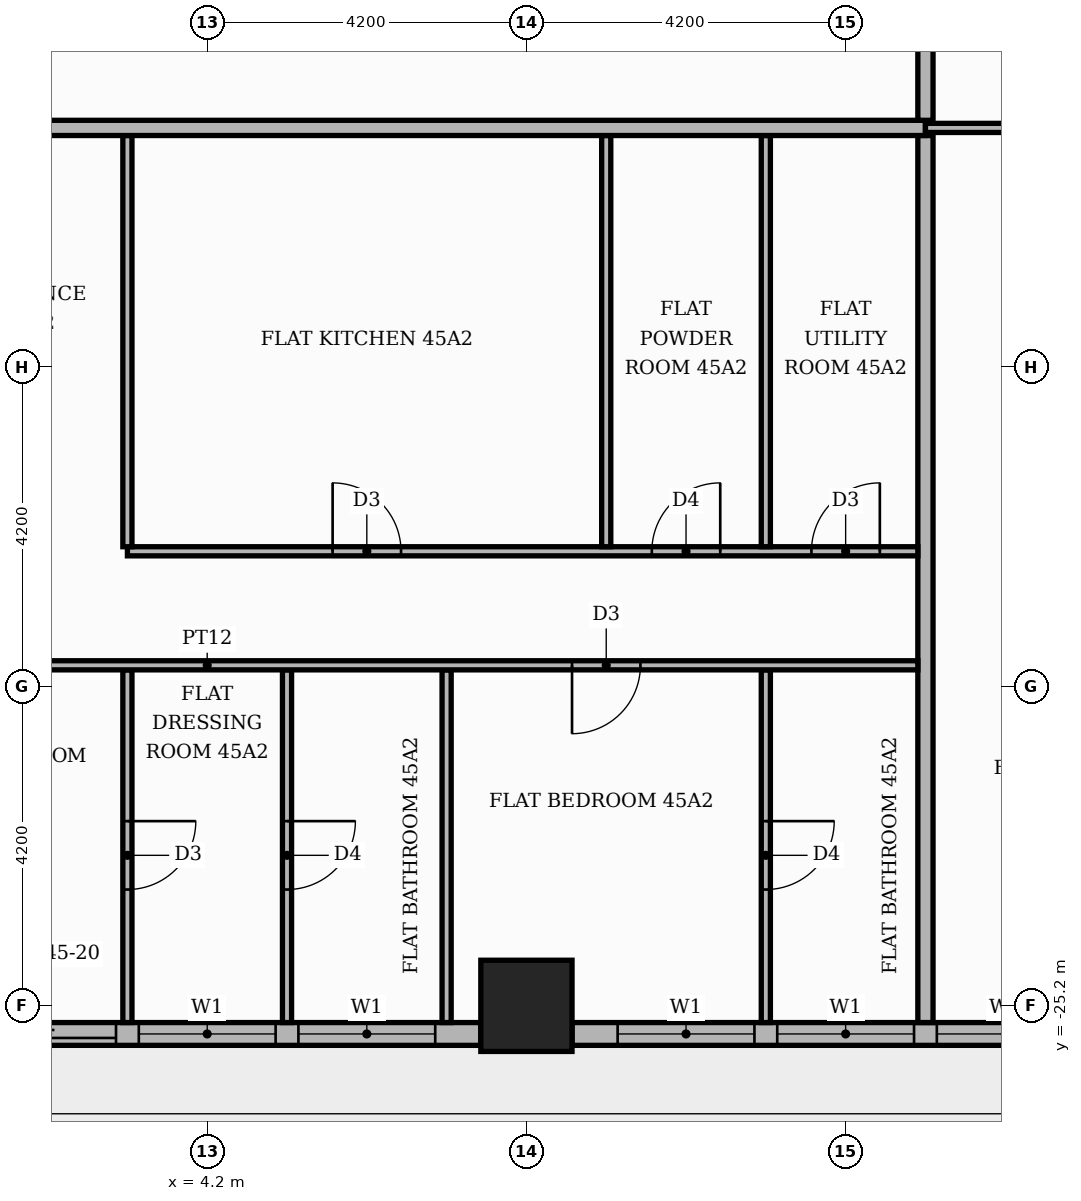
"""IFC4 building model, lengths in metres.
Left out: names, types, materials, properties, quantities, classifications, styles, units other than length and angle.
Written with IfcOpenShell. Run it as: python <this file> out.ifc"""

import sys

from ifc_helpers import new_model, si_unit, direction, frame, frame_2d, origin, origin_2d, place, context, subcontext, project, spatial, rectangle, extrude, element, fill, save


model = new_model("IFC4")
c1 = context("Model", 3, precision=1e-05, world=origin(), true_north=direction((0.0, 1.0)))
c2 = subcontext(c1, "Body", "Model", "MODEL_VIEW")
j1 = project(units=[si_unit("LENGTHUNIT", "METRE"), si_unit("PLANEANGLEUNIT", "RADIAN")], contexts=[c1])
p1 = place(None, origin())
s1 = spatial("IfcSite", under=j1, at=p1, CompositionType="ELEMENT")
p2 = place(p1, origin())
s2 = spatial("IfcBuilding", under=s1, at=p2, CompositionType="ELEMENT")
p3 = place(p2, frame((0.0, 0.0, 192.3)))
s3 = spatial("IfcBuildingStorey", under=s2, at=p3, CompositionType="ELEMENT", Elevation=192.3)
p4 = place(p3, frame((8.4, -25.2, 0.0), z_axis=(0.0, 0.0, 1.0), x_axis=(1.0, 0.0, 0.0)))
e1 = element("IfcColumn", 1, at=p4, inside=s3, PredefinedType="COLUMN", context=c2, shape_type="SweptSolid", body=[
    extrude(rectangle(XDim=1.2, YDim=1.2, at=origin_2d()), origin(), (0.0, 0.0, 1.0), 3.9),
])
p5 = place(p3, frame((0.6, -25.57, 0.0), z_axis=(0.0, 0.0, 1.0), x_axis=(1.0, 0.0, 0.0)))
e2 = element("IfcWall", 2, at=p5, inside=s3, PredefinedType="STANDARD", context=c2, shape_type="SweptSolid", body=[
    extrude(rectangle(XDim=7.2, YDim=0.3, at=frame_2d((3.6, 0.0))), origin(), (0.0, 0.0, 1.0), 3.48),
])
p6 = place(p5, frame((0.6, 0.0, 0.0)))
e3 = element("IfcOpeningElement", 3, at=p6, cuts=e2, PredefinedType="OPENING", context=c2, shape_type="SweptSolid", body=[
    extrude(rectangle(XDim=1.8, YDim=2.4, at=frame_2d((0.9, 1.2))), frame((0.0, 0.16, 0.0), z_axis=(0.0, -1.0, 0.0), x_axis=(1.0, 0.0, 0.0)), (0.0, 0.0, 1.0), 0.32),
])
p7 = place(p5, frame((2.7, 0.0, 0.9)))
e4 = element("IfcOpeningElement", 4, at=p7, cuts=e2, PredefinedType="OPENING", context=c2, shape_type="SweptSolid", body=[
    extrude(rectangle(XDim=1.8, YDim=2.1, at=frame_2d((0.9, 1.05))), frame((0.0, 0.16, 0.0), z_axis=(0.0, -1.0, 0.0), x_axis=(1.0, 0.0, 0.0)), (0.0, 0.0, 1.0), 0.32),
])
p8 = place(p5, frame((4.8, 0.0, 0.9)))
e5 = element("IfcOpeningElement", 5, at=p8, cuts=e2, PredefinedType="OPENING", context=c2, shape_type="SweptSolid", body=[
    extrude(rectangle(XDim=1.8, YDim=2.1, at=frame_2d((0.9, 1.05))), frame((0.0, 0.16, 0.0), z_axis=(0.0, -1.0, 0.0), x_axis=(1.0, 0.0, 0.0)), (0.0, 0.0, 1.0), 0.32),
])
p9 = place(p3, frame((9.0, -25.57, 0.0), z_axis=(0.0, 0.0, 1.0), x_axis=(1.0, 0.0, 0.0)))
e6 = element("IfcWall", 6, at=p9, inside=s3, PredefinedType="STANDARD", context=c2, shape_type="SweptSolid", body=[
    extrude(rectangle(XDim=7.2, YDim=0.3, at=frame_2d((3.6, 0.0))), origin(), (0.0, 0.0, 1.0), 3.48),
])
p10 = place(p9, frame((0.6, 0.0, 0.9)))
e7 = element("IfcOpeningElement", 7, at=p10, cuts=e6, PredefinedType="OPENING", context=c2, shape_type="SweptSolid", body=[
    extrude(rectangle(XDim=1.8, YDim=2.1, at=frame_2d((0.9, 1.05))), frame((0.0, 0.16, 0.0), z_axis=(0.0, -1.0, 0.0), x_axis=(1.0, 0.0, 0.0)), (0.0, 0.0, 1.0), 0.32),
])
p11 = place(p9, frame((2.7, 0.0, 0.9)))
e8 = element("IfcOpeningElement", 8, at=p11, cuts=e6, PredefinedType="OPENING", context=c2, shape_type="SweptSolid", body=[
    extrude(rectangle(XDim=1.8, YDim=2.1, at=frame_2d((0.9, 1.05))), frame((0.0, 0.16, 0.0), z_axis=(0.0, -1.0, 0.0), x_axis=(1.0, 0.0, 0.0)), (0.0, 0.0, 1.0), 0.32),
])
p12 = place(p9, frame((4.8, 0.0, 0.9)))
e9 = element("IfcOpeningElement", 9, at=p12, cuts=e6, PredefinedType="OPENING", context=c2, shape_type="SweptSolid", body=[
    extrude(rectangle(XDim=1.8, YDim=2.1, at=frame_2d((0.9, 1.05))), frame((0.0, 0.16, 0.0), z_axis=(0.0, -1.0, 0.0), x_axis=(1.0, 0.0, 0.0)), (0.0, 0.0, 1.0), 0.32),
])
p13 = place(p3, frame((3.15, -25.42, 0.0), z_axis=(0.0, 0.0, 1.0), x_axis=(0.0, 1.0, 0.0)))
e10 = element("IfcWall", 10, at=p13, inside=s3, PredefinedType="PARTITIONING", context=c2, shape_type="SweptSolid", body=[
    extrude(rectangle(XDim=4.64, YDim=0.12, at=frame_2d((2.32, 0.0))), origin(), (0.0, 0.0, 1.0), 3.48),
])
p14 = place(p13, frame((1.75, 0.0, 0.0)))
e11 = element("IfcOpeningElement", 11, at=p14, cuts=e10, PredefinedType="OPENING", context=c2, shape_type="SweptSolid", body=[
    extrude(rectangle(XDim=0.9, YDim=2.1, at=frame_2d((0.45, 1.05))), frame((0.0, 0.07, 0.0), z_axis=(0.0, -1.0, 0.0), x_axis=(1.0, 0.0, 0.0)), (0.0, 0.0, 1.0), 0.14),
])
p15 = place(p3, frame((5.25, -25.42, 0.0), z_axis=(0.0, 0.0, 1.0), x_axis=(0.0, 1.0, 0.0)))
e12 = element("IfcWall", 12, at=p15, inside=s3, PredefinedType="PARTITIONING", context=c2, shape_type="SweptSolid", body=[
    extrude(rectangle(XDim=4.64, YDim=0.12, at=frame_2d((2.32, 0.0))), origin(), (0.0, 0.0, 1.0), 3.48),
])
p16 = place(p15, frame((1.75, 0.0, 0.0)))
e13 = element("IfcOpeningElement", 13, at=p16, cuts=e12, PredefinedType="OPENING", context=c2, shape_type="SweptSolid", body=[
    extrude(rectangle(XDim=0.9, YDim=2.1, at=frame_2d((0.45, 1.05))), frame((0.0, 0.07, 0.0), z_axis=(0.0, -1.0, 0.0), x_axis=(1.0, 0.0, 0.0)), (0.0, 0.0, 1.0), 0.14),
])
p17 = place(p3, frame((7.35, -25.42, 0.0), z_axis=(0.0, 0.0, 1.0), x_axis=(0.0, 1.0, 0.0)))
e14 = element("IfcWall", 14, at=p17, inside=s3, PredefinedType="PARTITIONING", context=c2, shape_type="SweptSolid", body=[
    extrude(rectangle(XDim=4.64, YDim=0.12, at=frame_2d((2.32, 0.0))), origin(), (0.0, 0.0, 1.0), 3.48),
])
p18 = place(p3, frame((11.55, -25.42, 0.0), z_axis=(0.0, 0.0, 1.0), x_axis=(0.0, 1.0, 0.0)))
e15 = element("IfcWall", 15, at=p18, inside=s3, PredefinedType="PARTITIONING", context=c2, shape_type="SweptSolid", body=[
    extrude(rectangle(XDim=4.64, YDim=0.12, at=frame_2d((2.32, 0.0))), origin(), (0.0, 0.0, 1.0), 3.48),
])
p19 = place(p18, frame((1.75, 0.0, 0.0)))
e16 = element("IfcOpeningElement", 16, at=p19, cuts=e15, PredefinedType="OPENING", context=c2, shape_type="SweptSolid", body=[
    extrude(rectangle(XDim=0.9, YDim=2.1, at=frame_2d((0.45, 1.05))), frame((0.0, 0.07, 0.0), z_axis=(0.0, -1.0, 0.0), x_axis=(1.0, 0.0, 0.0)), (0.0, 0.0, 1.0), 0.14),
])
p20 = place(p3, frame((13.65, -25.42, 0.0), z_axis=(0.0, 0.0, 1.0), x_axis=(0.0, 1.0, 0.0)))
e17 = element("IfcWall", 17, at=p20, inside=s3, PredefinedType="PARTITIONING", context=c2, shape_type="SweptSolid", body=[
    extrude(rectangle(XDim=11.67, YDim=0.2, at=frame_2d((5.835, 0.0))), origin(), (0.0, 0.0, 1.0), 3.48),
])
p21 = place(p3, frame((-5.15, -20.72, 0.0), z_axis=(0.0, 0.0, 1.0), x_axis=(1.0, 0.0, 0.0)))
e18 = element("IfcWall", 18, at=p21, inside=s3, PredefinedType="PARTITIONING", context=c2, shape_type="SweptSolid", body=[
    extrude(rectangle(XDim=18.7, YDim=0.12, at=frame_2d((9.35, 0.0))), origin(), (0.0, 0.0, 1.0), 3.48),
])
p22 = place(p21, frame((1.5, 0.0, 0.0)))
e19 = element("IfcOpeningElement", 19, at=p22, cuts=e18, PredefinedType="OPENING", context=c2, shape_type="SweptSolid", body=[
    extrude(rectangle(XDim=1.0, YDim=2.1, at=frame_2d((0.5, 1.05))), frame((0.0, 0.07, 0.0), z_axis=(0.0, -1.0, 0.0), x_axis=(1.0, 0.0, 0.0)), (0.0, 0.0, 1.0), 0.14),
])
p23 = place(p21, frame((5.75, 0.0, 0.0)))
e20 = element("IfcOpeningElement", 20, at=p23, cuts=e18, PredefinedType="OPENING", context=c2, shape_type="SweptSolid", body=[
    extrude(rectangle(XDim=0.9, YDim=2.1, at=frame_2d((0.45, 1.05))), frame((0.0, 0.07, 0.0), z_axis=(0.0, -1.0, 0.0), x_axis=(1.0, 0.0, 0.0)), (0.0, 0.0, 1.0), 0.14),
])
p24 = place(p21, frame((14.15, 0.0, 0.0)))
e21 = element("IfcOpeningElement", 21, at=p24, cuts=e18, PredefinedType="OPENING", context=c2, shape_type="SweptSolid", body=[
    extrude(rectangle(XDim=0.9, YDim=2.1, at=frame_2d((0.45, 1.05))), frame((0.0, 0.07, 0.0), z_axis=(0.0, -1.0, 0.0), x_axis=(1.0, 0.0, 0.0)), (0.0, 0.0, 1.0), 0.14),
])
p25 = place(p3, frame((3.15, -19.22, 0.0), z_axis=(0.0, 0.0, 1.0), x_axis=(1.0, 0.0, 0.0)))
e22 = element("IfcWall", 22, at=p25, inside=s3, PredefinedType="PARTITIONING", context=c2, shape_type="SweptSolid", body=[
    extrude(rectangle(XDim=10.4, YDim=0.12, at=frame_2d((5.2, 0.0))), origin(), (0.0, 0.0, 1.0), 3.48),
])
p26 = place(p25, frame((2.7, 0.0, 0.0)))
e23 = element("IfcOpeningElement", 23, at=p26, cuts=e22, PredefinedType="OPENING", context=c2, shape_type="SweptSolid", body=[
    extrude(rectangle(XDim=0.9, YDim=2.1, at=frame_2d((0.45, 1.05))), frame((0.0, 0.07, 0.0), z_axis=(0.0, -1.0, 0.0), x_axis=(1.0, 0.0, 0.0)), (0.0, 0.0, 1.0), 0.14),
])
p27 = place(p25, frame((6.9, 0.0, 0.0)))
e24 = element("IfcOpeningElement", 24, at=p27, cuts=e22, PredefinedType="OPENING", context=c2, shape_type="SweptSolid", body=[
    extrude(rectangle(XDim=0.9, YDim=2.1, at=frame_2d((0.45, 1.05))), frame((0.0, 0.07, 0.0), z_axis=(0.0, -1.0, 0.0), x_axis=(1.0, 0.0, 0.0)), (0.0, 0.0, 1.0), 0.14),
])
p28 = place(p25, frame((9.0, 0.0, 0.0)))
e25 = element("IfcOpeningElement", 25, at=p28, cuts=e22, PredefinedType="OPENING", context=c2, shape_type="SweptSolid", body=[
    extrude(rectangle(XDim=0.9, YDim=2.1, at=frame_2d((0.45, 1.05))), frame((0.0, 0.07, 0.0), z_axis=(0.0, -1.0, 0.0), x_axis=(1.0, 0.0, 0.0)), (0.0, 0.0, 1.0), 0.14),
])
for number, where, z_axis, x_axis in (
    (26, (3.15, -19.16, 0.0), (0.0, 0.0, 1.0), (0.0, 1.0, 0.0)),
    (27, (9.45, -19.16, 0.0), (0.0, 0.0, 1.0), (0.0, 1.0, 0.0)),
    (28, (11.55, -19.16, 0.0), (0.0, 0.0, 1.0), (0.0, 1.0, 0.0)),
):
    element("IfcWall", number, at=place(p3, frame(where, z_axis=z_axis, x_axis=x_axis)), inside=s3, PredefinedType="PARTITIONING", context=c2, shape_type="SweptSolid", body=[
        extrude(rectangle(XDim=5.41, YDim=0.12, at=frame_2d((2.705, 0.0))), origin(), (0.0, 0.0, 1.0), 3.48),
    ])
p29 = place(p3, frame((-25.42, -13.65, 0.0), z_axis=(0.0, 0.0, 1.0), x_axis=(1.0, 0.0, 0.0)))
e29 = element("IfcWall", 29, at=p29, inside=s3, PredefinedType="PARTITIONING", context=c2, shape_type="SweptSolid", body=[
    extrude(rectangle(XDim=39.07, YDim=0.2, at=frame_2d((19.535, 0.0))), origin(), (0.0, 0.0, 1.0), 3.48),
])
p30 = place(p29, frame((13.32, 0.0, 0.0)))
e30 = element("IfcOpeningElement", 30, at=p30, cuts=e29, PredefinedType="OPENING", context=c2, shape_type="SweptSolid", body=[
    extrude(rectangle(XDim=1.1, YDim=2.4, at=frame_2d((0.55, 1.2))), frame((0.0, 0.11, 0.0), z_axis=(0.0, -1.0, 0.0), x_axis=(1.0, 0.0, 0.0)), (0.0, 0.0, 1.0), 0.22),
])
p31 = place(p29, frame((25.92, 0.0, 0.0)))
e31 = element("IfcOpeningElement", 31, at=p31, cuts=e29, PredefinedType="OPENING", context=c2, shape_type="SweptSolid", body=[
    extrude(rectangle(XDim=1.1, YDim=2.4, at=frame_2d((0.55, 1.2))), frame((0.0, 0.11, 0.0), z_axis=(0.0, -1.0, 0.0), x_axis=(1.0, 0.0, 0.0)), (0.0, 0.0, 1.0), 0.22),
])
p32 = place(p3, frame((13.65, -13.65, 0.0), z_axis=(0.0, 0.0, 1.0), x_axis=(1.0, 0.0, 0.0)))
e32 = element("IfcWall", 32, at=p32, inside=s3, PredefinedType="PARTITIONING", context=c2, shape_type="SweptSolid", body=[
    extrude(rectangle(XDim=6.47, YDim=0.12, at=frame_2d((3.235, 0.0))), origin(), (0.0, 0.0, 1.0), 3.48),
])
p33 = place(p32, frame((2.785, 0.0, 0.0)))
e33 = element("IfcOpeningElement", 33, at=p33, cuts=e32, PredefinedType="OPENING", context=c2, shape_type="SweptSolid", body=[
    extrude(rectangle(XDim=0.9, YDim=2.1, at=frame_2d((0.45, 1.05))), frame((0.0, 0.07, 0.0), z_axis=(0.0, -1.0, 0.0), x_axis=(1.0, 0.0, 0.0)), (0.0, 0.0, 1.0), 0.14),
])
p34 = place(p3, frame((13.65, -13.55, 0.0), z_axis=(0.0, 0.0, 1.0), x_axis=(0.0, 1.0, 0.0)))
e34 = element("IfcWall", 34, at=p34, inside=s3, PredefinedType="PARTITIONING", context=c2, shape_type="SweptSolid", body=[
    extrude(rectangle(XDim=2.45, YDim=0.2, at=frame_2d((1.225, 0.0))), origin(), (0.0, 0.0, 1.0), 3.48),
])
p35 = place(p6, origin())
e35 = element("IfcDoor", 35, at=p35, inside=s3, OperationType="SLIDING_TO_LEFT", PredefinedType="DOOR", context=c2, shape_type="SweptSolid", body=[
    extrude(rectangle(XDim=1.8, YDim=2.4, at=frame_2d((0.9, 1.2))), frame((0.0, 0.025, 0.0), z_axis=(0.0, -1.0, 0.0), x_axis=(1.0, 0.0, 0.0)), (0.0, 0.0, 1.0), 0.05),
])
fill(e3, e35)
p36 = place(p7, origin())
e36 = element("IfcWindow", 36, at=p36, inside=s3, PartitioningType="SINGLE_PANEL", PredefinedType="WINDOW", context=c2, shape_type="SweptSolid", body=[
    extrude(rectangle(XDim=1.8, YDim=2.1, at=frame_2d((0.9, 1.05))), frame((0.0, 0.03, 0.0), z_axis=(0.0, -1.0, 0.0), x_axis=(1.0, 0.0, 0.0)), (0.0, 0.0, 1.0), 0.06),
])
fill(e4, e36)
p37 = place(p8, origin())
e37 = element("IfcWindow", 37, at=p37, inside=s3, PartitioningType="SINGLE_PANEL", PredefinedType="WINDOW", context=c2, shape_type="SweptSolid", body=[
    extrude(rectangle(XDim=1.8, YDim=2.1, at=frame_2d((0.9, 1.05))), frame((0.0, 0.03, 0.0), z_axis=(0.0, -1.0, 0.0), x_axis=(1.0, 0.0, 0.0)), (0.0, 0.0, 1.0), 0.06),
])
fill(e5, e37)
p38 = place(p10, origin())
e38 = element("IfcWindow", 38, at=p38, inside=s3, PartitioningType="SINGLE_PANEL", PredefinedType="WINDOW", context=c2, shape_type="SweptSolid", body=[
    extrude(rectangle(XDim=1.8, YDim=2.1, at=frame_2d((0.9, 1.05))), frame((0.0, 0.03, 0.0), z_axis=(0.0, -1.0, 0.0), x_axis=(1.0, 0.0, 0.0)), (0.0, 0.0, 1.0), 0.06),
])
fill(e7, e38)
p39 = place(p11, origin())
e39 = element("IfcWindow", 39, at=p39, inside=s3, PartitioningType="SINGLE_PANEL", PredefinedType="WINDOW", context=c2, shape_type="SweptSolid", body=[
    extrude(rectangle(XDim=1.8, YDim=2.1, at=frame_2d((0.9, 1.05))), frame((0.0, 0.03, 0.0), z_axis=(0.0, -1.0, 0.0), x_axis=(1.0, 0.0, 0.0)), (0.0, 0.0, 1.0), 0.06),
])
fill(e8, e39)
p40 = place(p12, origin())
e40 = element("IfcWindow", 40, at=p40, inside=s3, PartitioningType="SINGLE_PANEL", PredefinedType="WINDOW", context=c2, shape_type="SweptSolid", body=[
    extrude(rectangle(XDim=1.8, YDim=2.1, at=frame_2d((0.9, 1.05))), frame((0.0, 0.03, 0.0), z_axis=(0.0, -1.0, 0.0), x_axis=(1.0, 0.0, 0.0)), (0.0, 0.0, 1.0), 0.06),
])
fill(e9, e40)
p41 = place(p26, origin())
e41 = element("IfcDoor", 41, at=p41, inside=s3, OperationType="SINGLE_SWING_LEFT", PredefinedType="DOOR", context=c2, shape_type="SweptSolid", body=[
    extrude(rectangle(XDim=0.9, YDim=2.1, at=frame_2d((0.45, 1.05))), frame((0.0, 0.025, 0.0), z_axis=(0.0, -1.0, 0.0), x_axis=(1.0, 0.0, 0.0)), (0.0, 0.0, 1.0), 0.05),
])
fill(e23, e41)
p42 = place(p27, origin())
e42 = element("IfcDoor", 42, at=p42, inside=s3, OperationType="SINGLE_SWING_RIGHT", PredefinedType="DOOR", context=c2, shape_type="SweptSolid", body=[
    extrude(rectangle(XDim=0.9, YDim=2.1, at=frame_2d((0.45, 1.05))), frame((0.0, 0.025, 0.0), z_axis=(0.0, -1.0, 0.0), x_axis=(1.0, 0.0, 0.0)), (0.0, 0.0, 1.0), 0.05),
])
fill(e24, e42)
p43 = place(p28, origin())
e43 = element("IfcDoor", 43, at=p43, inside=s3, OperationType="SINGLE_SWING_RIGHT", PredefinedType="DOOR", context=c2, shape_type="SweptSolid", body=[
    extrude(rectangle(XDim=0.9, YDim=2.1, at=frame_2d((0.45, 1.05))), frame((0.0, 0.025, 0.0), z_axis=(0.0, -1.0, 0.0), x_axis=(1.0, 0.0, 0.0)), (0.0, 0.0, 1.0), 0.05),
])
fill(e25, e43)
p44 = place(p14, frame((0.9, 0.0, 0.0), z_axis=(0.0, 0.0, 1.0), x_axis=(-1.0, 0.0, 0.0)))
e44 = element("IfcDoor", 44, at=p44, inside=s3, OperationType="SINGLE_SWING_RIGHT", PredefinedType="DOOR", context=c2, shape_type="SweptSolid", body=[
    extrude(rectangle(XDim=0.9, YDim=2.1, at=frame_2d((0.45, 1.05))), frame((0.0, 0.025, 0.0), z_axis=(0.0, -1.0, 0.0), x_axis=(1.0, 0.0, 0.0)), (0.0, 0.0, 1.0), 0.05),
])
fill(e11, e44)
p45 = place(p16, frame((0.9, 0.0, 0.0), z_axis=(0.0, 0.0, 1.0), x_axis=(-1.0, 0.0, 0.0)))
e45 = element("IfcDoor", 45, at=p45, inside=s3, OperationType="SINGLE_SWING_RIGHT", PredefinedType="DOOR", context=c2, shape_type="SweptSolid", body=[
    extrude(rectangle(XDim=0.9, YDim=2.1, at=frame_2d((0.45, 1.05))), frame((0.0, 0.025, 0.0), z_axis=(0.0, -1.0, 0.0), x_axis=(1.0, 0.0, 0.0)), (0.0, 0.0, 1.0), 0.05),
])
fill(e13, e45)
p46 = place(p24, frame((0.9, 0.0, 0.0), z_axis=(0.0, 0.0, 1.0), x_axis=(-1.0, 0.0, 0.0)))
e46 = element("IfcDoor", 46, at=p46, inside=s3, OperationType="SINGLE_SWING_LEFT", PredefinedType="DOOR", context=c2, shape_type="SweptSolid", body=[
    extrude(rectangle(XDim=0.9, YDim=2.1, at=frame_2d((0.45, 1.05))), frame((0.0, 0.025, 0.0), z_axis=(0.0, -1.0, 0.0), x_axis=(1.0, 0.0, 0.0)), (0.0, 0.0, 1.0), 0.05),
])
fill(e21, e46)
p47 = place(p19, frame((0.9, 0.0, 0.0), z_axis=(0.0, 0.0, 1.0), x_axis=(-1.0, 0.0, 0.0)))
e47 = element("IfcDoor", 47, at=p47, inside=s3, OperationType="SINGLE_SWING_RIGHT", PredefinedType="DOOR", context=c2, shape_type="SweptSolid", body=[
    extrude(rectangle(XDim=0.9, YDim=2.1, at=frame_2d((0.45, 1.05))), frame((0.0, 0.025, 0.0), z_axis=(0.0, -1.0, 0.0), x_axis=(1.0, 0.0, 0.0)), (0.0, 0.0, 1.0), 0.05),
])
fill(e16, e47)
save(model, sys.argv[1])
